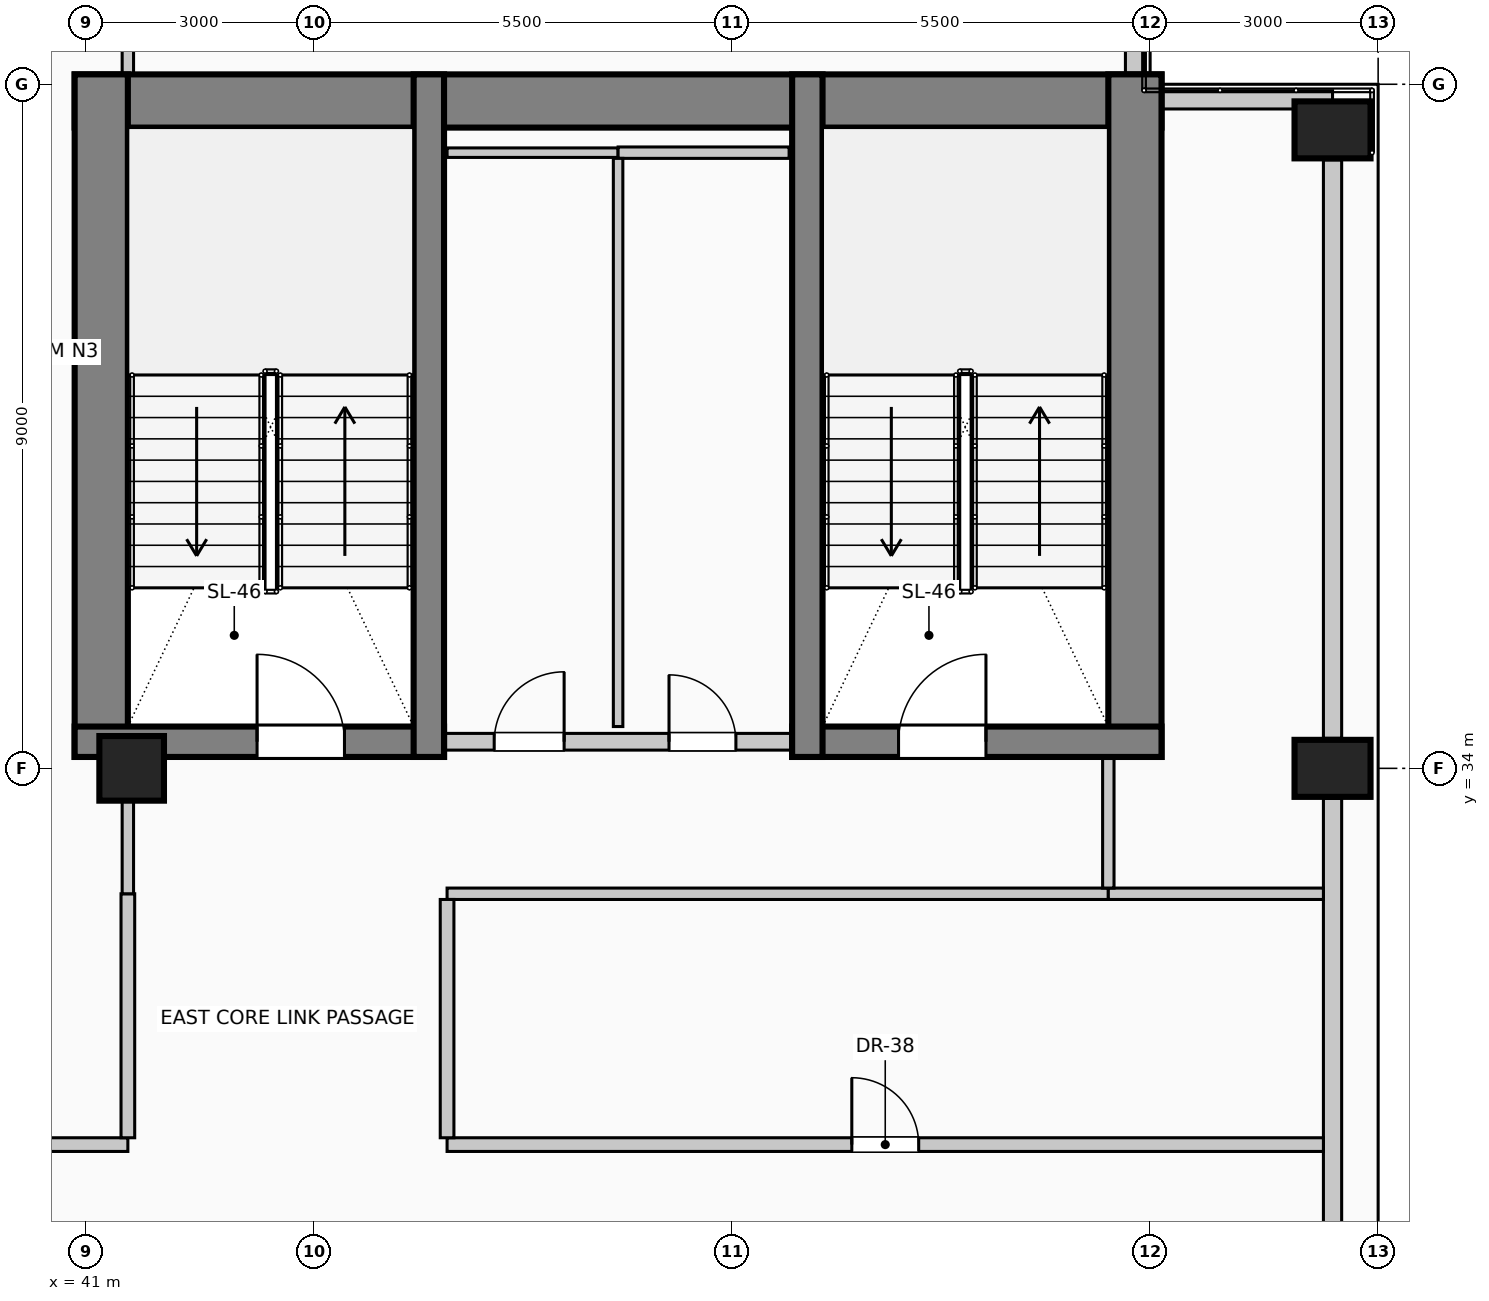
"""IFC4 building model, lengths in metres.
Left out: names, types, materials, properties, quantities, classifications, styles, units other than length and angle.
Written with IfcOpenShell. Run it as: python <this file> out.ifc"""

import sys

from ifc_helpers import new_model, si_unit, direction, frame, frame_2d, origin, origin_2d, place, context, subcontext, project, spatial, rectangle, circle, extrude, element, fill, save


model = new_model("IFC4")
c1 = context("Model", 3, precision=1e-05, world=origin(), true_north=direction((0.0, 1.0)))
c2 = subcontext(c1, "Body", "Model", "MODEL_VIEW")
j1 = project(units=[si_unit("LENGTHUNIT", "METRE"), si_unit("PLANEANGLEUNIT", "RADIAN")], contexts=[c1])
p1 = place(None, origin())
s1 = spatial("IfcSite", under=j1, at=p1, CompositionType="ELEMENT")
p2 = place(p1, origin())
s2 = spatial("IfcBuilding", under=s1, at=p2, CompositionType="ELEMENT")
p3 = place(p2, frame((0.0, 0.0, 268.6)))
s3 = spatial("IfcBuildingStorey", under=s2, at=p3, CompositionType="ELEMENT", Elevation=268.6)
p4 = place(p3, frame((40.85, 42.78, 0.0), z_axis=(0.0, 0.0, 1.0), x_axis=(1.0, 0.0, 0.0)))
e1 = element("IfcWall", 1, at=p4, inside=s3, PredefinedType="SHEAR", context=c2, shape_type="SweptSolid", body=[
    extrude(rectangle(XDim=14.3, YDim=0.7, at=frame_2d((7.15, 0.0))), origin(), (0.0, 0.0, 1.0), 4.0),
])
for number, where, z_axis, x_axis in (
    (2, (41.2, 34.15, 0.0), (0.0, 0.0, 1.0), (0.0, 1.0, 0.0)),
    (3, (54.8, 34.15, 0.0), (0.0, 0.0, 1.0), (0.0, 1.0, 0.0)),
):
    element("IfcWall", number, at=place(p3, frame(where, z_axis=z_axis, x_axis=x_axis)), inside=s3, PredefinedType="SHEAR", context=c2, shape_type="SweptSolid", body=[
        extrude(rectangle(XDim=8.98, YDim=0.7, at=frame_2d((4.49, 0.0))), origin(), (0.0, 0.0, 1.0), 4.0),
    ])
p5 = place(p3, frame((40.85, 34.35, 0.0), z_axis=(0.0, 0.0, 1.0), x_axis=(1.0, 0.0, 0.0)))
e4 = element("IfcWall", 4, at=p5, inside=s3, PredefinedType="SHEAR", context=c2, shape_type="SweptSolid", body=[
    extrude(rectangle(XDim=4.86, YDim=0.4, at=frame_2d((2.43, 0.0))), origin(), (0.0, 0.0, 1.0), 4.0),
])
p6 = place(p5, frame((2.4, 0.0, 0.0)))
e5 = element("IfcOpeningElement", 5, at=p6, cuts=e4, PredefinedType="OPENING", context=c2, shape_type="SweptSolid", body=[
    extrude(rectangle(XDim=1.15, YDim=2.2, at=frame_2d((0.575, 1.1))), frame((0.0, 0.21, 0.0), z_axis=(0.0, -1.0, 0.0), x_axis=(1.0, 0.0, 0.0)), (0.0, 0.0, 1.0), 0.42),
])
p7 = place(p3, frame((45.51, 34.15, 0.0), z_axis=(0.0, 0.0, 1.0), x_axis=(0.0, 1.0, 0.0)))
e6 = element("IfcWall", 6, at=p7, inside=s3, PredefinedType="SHEAR", context=c2, shape_type="SweptSolid", body=[
    extrude(rectangle(XDim=8.98, YDim=0.4, at=frame_2d((4.49, 0.0))), origin(), (0.0, 0.0, 1.0), 4.0),
])
p8 = place(p3, frame((50.29, 34.35, 0.0), z_axis=(0.0, 0.0, 1.0), x_axis=(1.0, 0.0, 0.0)))
e7 = element("IfcWall", 7, at=p8, inside=s3, PredefinedType="SHEAR", context=c2, shape_type="SweptSolid", body=[
    extrude(rectangle(XDim=4.86, YDim=0.4, at=frame_2d((2.43, 0.0))), origin(), (0.0, 0.0, 1.0), 4.0),
])
p9 = place(p8, frame((1.4, 0.0, 0.0)))
e8 = element("IfcOpeningElement", 8, at=p9, cuts=e7, PredefinedType="OPENING", context=c2, shape_type="SweptSolid", body=[
    extrude(rectangle(XDim=1.15, YDim=2.2, at=frame_2d((0.575, 1.1))), frame((0.0, 0.21, 0.0), z_axis=(0.0, -1.0, 0.0), x_axis=(1.0, 0.0, 0.0)), (0.0, 0.0, 1.0), 0.42),
])
p10 = place(p3, frame((50.49, 34.15, 0.0), z_axis=(0.0, 0.0, 1.0), x_axis=(0.0, 1.0, 0.0)))
e9 = element("IfcWall", 9, at=p10, inside=s3, PredefinedType="SHEAR", context=c2, shape_type="SweptSolid", body=[
    extrude(rectangle(XDim=8.98, YDim=0.4, at=frame_2d((4.49, 0.0))), origin(), (0.0, 0.0, 1.0), 4.0),
])
for number, where, z_axis, x_axis in (
    (10, (57.4, 34.0, 0.0), (0.0, 0.0, 1.0), (0.0, 1.0, 0.0)),
    (11, (57.4, 42.4, 0.0), (0.0, 0.0, 1.0), (0.0, 1.0, 0.0)),
):
    element("IfcColumn", number, at=place(p3, frame(where, z_axis=z_axis, x_axis=x_axis)), inside=s3, PredefinedType="COLUMN", context=c2, shape_type="SweptSolid", body=[
        extrude(rectangle(XDim=0.75, YDim=1.0, at=origin_2d()), origin(), (0.0, 0.0, 1.0), 4.0),
    ])
p11 = place(p3, frame((41.6, 34.0, 0.0), z_axis=(0.0, 0.0, 1.0), x_axis=(1.0, 0.0, 0.0)))
e12 = element("IfcColumn", 12, at=p11, inside=s3, PredefinedType="COLUMN", context=c2, shape_type="SweptSolid", body=[
    extrude(circle(Radius=0.425, at=origin_2d()), origin(), (0.0, 0.0, 1.0), 4.0),
])
p12 = place(p3, frame((57.4, 33.605, 0.0), z_axis=(0.0, 0.0, 1.0), x_axis=(0.0, -1.0, 0.0)))
e13 = element("IfcWall", 13, at=p12, inside=s3, PredefinedType="SOLIDWALL", context=c2, shape_type="SweptSolid", body=[
    extrude(rectangle(XDim=7.21, YDim=0.24, at=frame_2d((3.605, 0.0))), origin(), (0.0, 0.0, 1.0), 3.0),
])
p13 = place(p3, frame((57.4, 42.005, 0.0), z_axis=(0.0, 0.0, 1.0), x_axis=(0.0, -1.0, 0.0)))
e14 = element("IfcWall", 14, at=p13, inside=s3, PredefinedType="SOLIDWALL", context=c2, shape_type="SweptSolid", body=[
    extrude(rectangle(XDim=7.61, YDim=0.24, at=frame_2d((3.805, 0.0))), origin(), (0.0, 0.0, 1.0), 3.0),
])
p14 = place(p3, frame((54.795, 45.4, 0.0), z_axis=(0.0, 0.0, 1.0), x_axis=(0.0, -1.0, 0.0)))
e15 = element("IfcWall", 15, at=p14, inside=s3, PredefinedType="SOLIDWALL", context=c2, shape_type="SweptSolid", body=[
    extrude(rectangle(XDim=2.265, YDim=0.24, at=frame_2d((1.132, 0.0))), origin(), (0.0, 0.0, 1.0), 3.75),
])
p15 = place(p3, frame((55.155, 42.795, 0.0), z_axis=(0.0, 0.0, 1.0), x_axis=(1.0, 0.0, 0.0)))
e16 = element("IfcWall", 16, at=p15, inside=s3, PredefinedType="SOLIDWALL", context=c2, shape_type="SweptSolid", body=[
    extrude(rectangle(XDim=2.245, YDim=0.24, at=frame_2d((1.123, 0.0))), origin(), (0.0, 0.0, 1.0), 3.75),
])
p16 = place(p3, frame((45.72, 34.35, 0.0), z_axis=(0.0, 0.0, 1.0), x_axis=(1.0, 0.0, 0.0)))
e17 = element("IfcWall", 17, at=p16, inside=s3, PredefinedType="PARTITIONING", context=c2, shape_type="SweptSolid", body=[
    extrude(rectangle(XDim=4.56, YDim=0.22, at=frame_2d((2.28, 0.0))), origin(), (0.0, 0.0, 1.0), 3.75),
])
p17 = place(p16, frame((0.65, 0.0, 0.0)))
e18 = element("IfcOpeningElement", 18, at=p17, cuts=e17, PredefinedType="OPENING", context=c2, shape_type="SweptSolid", body=[
    extrude(rectangle(XDim=0.92, YDim=2.1, at=frame_2d((0.46, 1.05))), frame((0.0, 0.12, 0.0), z_axis=(0.0, -1.0, 0.0), x_axis=(1.0, 0.0, 0.0)), (0.0, 0.0, 1.0), 0.24),
])
p18 = place(p16, frame((2.95, 0.0, 0.0)))
e19 = element("IfcOpeningElement", 19, at=p18, cuts=e17, PredefinedType="OPENING", context=c2, shape_type="SweptSolid", body=[
    extrude(rectangle(XDim=0.88, YDim=2.1, at=frame_2d((0.44, 1.05))), frame((0.0, 0.12, 0.0), z_axis=(0.0, -1.0, 0.0), x_axis=(1.0, 0.0, 0.0)), (0.0, 0.0, 1.0), 0.24),
])
p19 = place(p3, frame((34.42, 29.05, 0.0), z_axis=(0.0, 0.0, 1.0), x_axis=(1.0, 0.0, 0.0)))
e20 = element("IfcWall", 20, at=p19, inside=s3, PredefinedType="PARTITIONING", context=c2, shape_type="SweptSolid", body=[
    extrude(rectangle(XDim=7.13, YDim=0.18, at=frame_2d((3.565, 0.0))), origin(), (0.0, 0.0, 1.0), 3.75),
])
p20 = place(p19, frame((3.09, 0.0, 0.0)))
e21 = element("IfcOpeningElement", 21, at=p20, cuts=e20, PredefinedType="OPENING", context=c2, shape_type="SweptSolid", body=[
    extrude(rectangle(XDim=0.95, YDim=2.15, at=frame_2d((0.475, 1.075))), frame((0.0, 0.1, 0.0), z_axis=(0.0, -1.0, 0.0), x_axis=(1.0, 0.0, 0.0)), (0.0, 0.0, 1.0), 0.2),
])
p21 = place(p3, frame((45.75, 29.05, 0.0), z_axis=(0.0, 0.0, 1.0), x_axis=(1.0, 0.0, 0.0)))
e22 = element("IfcWall", 22, at=p21, inside=s3, PredefinedType="PARTITIONING", context=c2, shape_type="SweptSolid", body=[
    extrude(rectangle(XDim=11.53, YDim=0.18, at=frame_2d((5.765, 0.0))), origin(), (0.0, 0.0, 1.0), 3.75),
])
p22 = place(p21, frame((5.325, 0.0, 0.0)))
e23 = element("IfcOpeningElement", 23, at=p22, cuts=e22, PredefinedType="OPENING", context=c2, shape_type="SweptSolid", body=[
    extrude(rectangle(XDim=0.88, YDim=2.1, at=frame_2d((0.44, 1.05))), frame((0.0, 0.1, 0.0), z_axis=(0.0, -1.0, 0.0), x_axis=(1.0, 0.0, 0.0)), (0.0, 0.0, 1.0), 0.2),
])
p23 = place(p3, frame((45.75, 32.35, 0.0), z_axis=(0.0, 0.0, 1.0), x_axis=(1.0, 0.0, 0.0)))
e24 = element("IfcWall", 24, at=p23, inside=s3, PredefinedType="PARTITIONING", context=c2, shape_type="SweptSolid", body=[
    extrude(rectangle(XDim=8.7, YDim=0.15, at=frame_2d((4.35, 0.0))), origin(), (0.0, 0.0, 1.0), 3.75),
])
p24 = place(p3, frame((54.45, 32.35, 0.0), z_axis=(0.0, 0.0, 1.0), x_axis=(1.0, 0.0, 0.0)))
e25 = element("IfcWall", 25, at=p24, inside=s3, PredefinedType="PARTITIONING", context=c2, shape_type="SweptSolid", body=[
    extrude(rectangle(XDim=2.83, YDim=0.15, at=frame_2d((1.415, 0.0))), origin(), (0.0, 0.0, 1.0), 3.75),
])
p25 = place(p3, frame((45.75, 42.1, 0.0), z_axis=(0.0, 0.0, 1.0), x_axis=(1.0, 0.0, 0.0)))
e26 = element("IfcWall", 26, at=p25, inside=s3, PredefinedType="PARTITIONING", context=c2, shape_type="SweptSolid", body=[
    extrude(rectangle(XDim=2.25, YDim=0.125, at=frame_2d((1.125, 0.0))), origin(), (0.0, 0.0, 1.0), 3.75),
])
p26 = place(p3, frame((48.0, 42.1, 0.0), z_axis=(0.0, 0.0, 1.0), x_axis=(1.0, 0.0, 0.0)))
e27 = element("IfcWall", 27, at=p26, inside=s3, PredefinedType="PARTITIONING", context=c2, shape_type="SweptSolid", body=[
    extrude(rectangle(XDim=2.25, YDim=0.15, at=frame_2d((1.125, 0.0))), origin(), (0.0, 0.0, 1.0), 3.75),
])
p27 = place(p3, frame((41.55, 29.14, 0.0), z_axis=(0.0, 0.0, 1.0), x_axis=(0.0, 1.0, 0.0)))
e28 = element("IfcWall", 28, at=p27, inside=s3, PredefinedType="PARTITIONING", context=c2, shape_type="SweptSolid", body=[
    extrude(rectangle(XDim=3.21, YDim=0.18, at=frame_2d((1.605, 0.0))), origin(), (0.0, 0.0, 1.0), 3.195),
])
p28 = place(p3, frame((41.55, 32.35, 0.0), z_axis=(0.0, 0.0, 1.0), x_axis=(0.0, 1.0, 0.0)))
e29 = element("IfcWall", 29, at=p28, inside=s3, PredefinedType="PARTITIONING", context=c2, shape_type="SweptSolid", body=[
    extrude(rectangle(XDim=1.225, YDim=0.15, at=frame_2d((0.612, 0.0))), origin(), (0.0, 0.0, 1.0), 3.195),
])
p29 = place(p3, frame((41.55, 43.13, 0.0), z_axis=(0.0, 0.0, 1.0), x_axis=(0.0, 1.0, 0.0)))
e30 = element("IfcWall", 30, at=p29, inside=s3, PredefinedType="PARTITIONING", context=c2, shape_type="SweptSolid", body=[
    extrude(rectangle(XDim=1.62, YDim=0.15, at=frame_2d((0.81, 0.0))), origin(), (0.0, 0.0, 1.0), 3.75),
])
p30 = place(p3, frame((45.75, 29.14, 0.0), z_axis=(0.0, 0.0, 1.0), x_axis=(0.0, 1.0, 0.0)))
e31 = element("IfcWall", 31, at=p30, inside=s3, PredefinedType="PARTITIONING", context=c2, shape_type="SweptSolid", body=[
    extrude(rectangle(XDim=3.135, YDim=0.18, at=frame_2d((1.567, 0.0))), origin(), (0.0, 0.0, 1.0), 3.75),
])
p31 = place(p3, frame((48.0, 34.55, 0.0), z_axis=(0.0, 0.0, 1.0), x_axis=(0.0, 1.0, 0.0)))
e32 = element("IfcWall", 32, at=p31, inside=s3, PredefinedType="PARTITIONING", context=c2, shape_type="SweptSolid", body=[
    extrude(rectangle(XDim=7.475, YDim=0.125, at=frame_2d((3.737, 0.0))), origin(), (0.0, 0.0, 1.0), 3.75),
])
p32 = place(p3, frame((54.45, 32.425, 0.0), z_axis=(0.0, 0.0, 1.0), x_axis=(0.0, 1.0, 0.0)))
e33 = element("IfcWall", 33, at=p32, inside=s3, PredefinedType="PARTITIONING", context=c2, shape_type="SweptSolid", body=[
    extrude(rectangle(XDim=1.725, YDim=0.15, at=frame_2d((0.862, 0.0))), origin(), (0.0, 0.0, 1.0), 3.75),
])
p33 = place(p6, origin())
e34 = element("IfcDoor", 34, at=p33, inside=s3, OperationType="SINGLE_SWING_LEFT", PredefinedType="DOOR", context=c2, shape_type="SweptSolid", body=[
    extrude(rectangle(XDim=1.15, YDim=2.2, at=frame_2d((0.575, 1.1))), frame((0.0, 0.025, 0.0), z_axis=(0.0, -1.0, 0.0), x_axis=(1.0, 0.0, 0.0)), (0.0, 0.0, 1.0), 0.05),
])
fill(e5, e34)
p34 = place(p17, origin())
e35 = element("IfcDoor", 35, at=p34, inside=s3, OperationType="SINGLE_SWING_RIGHT", PredefinedType="DOOR", context=c2, shape_type="SweptSolid", body=[
    extrude(rectangle(XDim=0.92, YDim=2.1, at=frame_2d((0.46, 1.05))), frame((0.0, 0.025, 0.0), z_axis=(0.0, -1.0, 0.0), x_axis=(1.0, 0.0, 0.0)), (0.0, 0.0, 1.0), 0.05),
])
fill(e18, e35)
p35 = place(p18, origin())
e36 = element("IfcDoor", 36, at=p35, inside=s3, OperationType="SINGLE_SWING_LEFT", PredefinedType="DOOR", context=c2, shape_type="SweptSolid", body=[
    extrude(rectangle(XDim=0.88, YDim=2.1, at=frame_2d((0.44, 1.05))), frame((0.0, 0.025, 0.0), z_axis=(0.0, -1.0, 0.0), x_axis=(1.0, 0.0, 0.0)), (0.0, 0.0, 1.0), 0.05),
])
fill(e19, e36)
p36 = place(p9, origin())
e37 = element("IfcDoor", 37, at=p36, inside=s3, OperationType="SINGLE_SWING_RIGHT", PredefinedType="DOOR", context=c2, shape_type="SweptSolid", body=[
    extrude(rectangle(XDim=1.15, YDim=2.2, at=frame_2d((0.575, 1.1))), frame((0.0, 0.025, 0.0), z_axis=(0.0, -1.0, 0.0), x_axis=(1.0, 0.0, 0.0)), (0.0, 0.0, 1.0), 0.05),
])
fill(e8, e37)
p37 = place(p22, origin())
e38 = element("IfcDoor", 38, at=p37, inside=s3, OperationType="SINGLE_SWING_LEFT", PredefinedType="DOOR", context=c2, shape_type="SweptSolid", body=[
    extrude(rectangle(XDim=0.88, YDim=2.1, at=frame_2d((0.44, 1.05))), frame((0.0, 0.025, 0.0), z_axis=(0.0, -1.0, 0.0), x_axis=(1.0, 0.0, 0.0)), (0.0, 0.0, 1.0), 0.05),
])
fill(e23, e38)
save(model, sys.argv[1])
